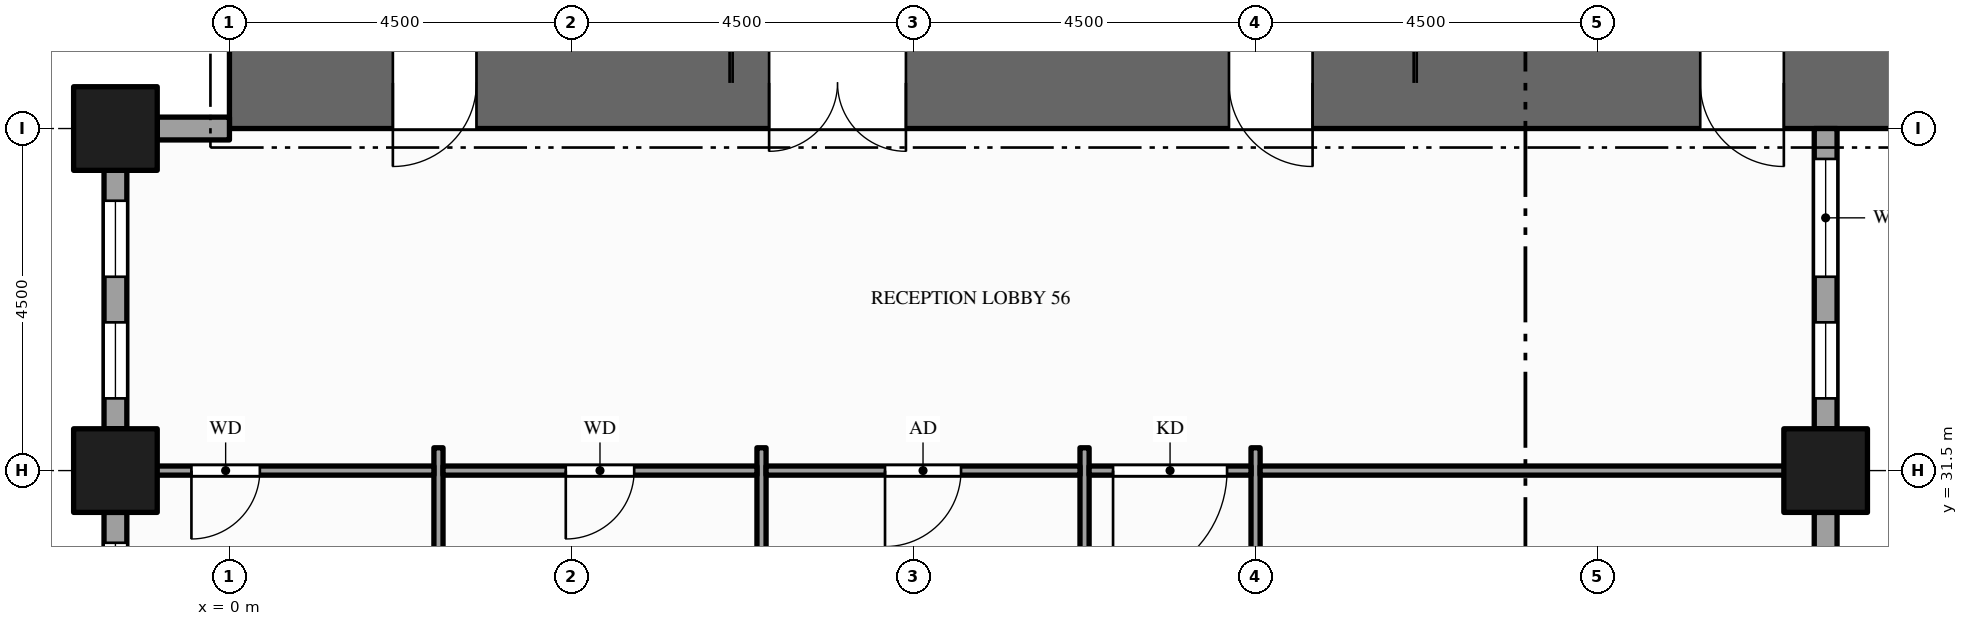
"""IFC4 building model, lengths in metres.
Left out: names, types, materials, properties, quantities, classifications, styles, units other than length and angle.
Written with IfcOpenShell. Run it as: python <this file> out.ifc"""

import sys

from ifc_helpers import new_model, si_unit, direction, frame, frame_2d, origin, origin_2d, place, context, subcontext, project, spatial, rectangle, hollow_rectangle, extrude, element, fill, save


model = new_model("IFC4")
c1 = context("Model", 3, precision=1e-05, world=origin(), true_north=direction((0.0, 1.0)))
c2 = subcontext(c1, "Body", "Model", "MODEL_VIEW")
j1 = project(units=[si_unit("LENGTHUNIT", "METRE"), si_unit("PLANEANGLEUNIT", "RADIAN")], contexts=[c1])
p1 = place(None, origin())
s1 = spatial("IfcSite", under=j1, at=p1, CompositionType="ELEMENT")
p2 = place(p1, origin())
s2 = spatial("IfcBuilding", under=s1, at=p2, CompositionType="ELEMENT")
p3 = place(p2, frame((0.0, 0.0, 49.0)))
s3 = spatial("IfcBuildingStorey", under=s2, at=p3, CompositionType="ELEMENT", Elevation=49.0)
p4 = place(p3, frame((0.0, 36.6, -0.15), z_axis=(0.0, 0.0, 1.0), x_axis=(1.0, 0.0, 0.0)))
e1 = element("IfcWall", 1, at=p4, inside=s3, PredefinedType="SHEAR", context=c2, shape_type="SweptSolid", body=[
    extrude(rectangle(XDim=22.5, YDim=1.2, at=frame_2d((11.25, 0.0))), origin(), (0.0, 0.0, 1.0), 4.0),
])
p5 = place(p4, frame((7.1, 0.0, 0.15)))
e2 = element("IfcOpeningElement", 2, at=p5, cuts=e1, PredefinedType="OPENING", context=c2, shape_type="SweptSolid", body=[
    extrude(rectangle(XDim=1.8, YDim=2.1, at=frame_2d((0.9, 1.05))), frame((0.0, 0.61, 0.0), z_axis=(0.0, -1.0, 0.0), x_axis=(1.0, 0.0, 0.0)), (0.0, 0.0, 1.0), 1.22),
])
p6 = place(p4, frame((13.15, 0.0, 0.15)))
e3 = element("IfcOpeningElement", 3, at=p6, cuts=e1, PredefinedType="OPENING", context=c2, shape_type="SweptSolid", body=[
    extrude(rectangle(XDim=1.1, YDim=2.1, at=frame_2d((0.55, 1.05))), frame((0.0, 0.61, 0.0), z_axis=(0.0, -1.0, 0.0), x_axis=(1.0, 0.0, 0.0)), (0.0, 0.0, 1.0), 1.22),
])
p7 = place(p4, frame((2.15, 0.0, 0.15)))
e4 = element("IfcOpeningElement", 4, at=p7, cuts=e1, PredefinedType="OPENING", context=c2, shape_type="SweptSolid", body=[
    extrude(rectangle(XDim=1.1, YDim=2.1, at=frame_2d((0.55, 1.05))), frame((0.0, 0.61, 0.0), z_axis=(0.0, -1.0, 0.0), x_axis=(1.0, 0.0, 0.0)), (0.0, 0.0, 1.0), 1.22),
])
p8 = place(p4, frame((19.35, 0.0, 0.15)))
e5 = element("IfcOpeningElement", 5, at=p8, cuts=e1, PredefinedType="OPENING", context=c2, shape_type="SweptSolid", body=[
    extrude(rectangle(XDim=1.1, YDim=2.1, at=frame_2d((0.55, 1.05))), frame((0.0, 0.61, 0.0), z_axis=(0.0, -1.0, 0.0), x_axis=(1.0, 0.0, 0.0)), (0.0, 0.0, 1.0), 1.22),
])
for number, where, z_axis, x_axis in (
    (6, (-1.5, 31.5, -0.15), (0.0, 0.0, 1.0), (1.0, 0.0, 0.0)),
    (7, (-1.5, 36.0, -0.15), (0.0, 0.0, 1.0), (1.0, 0.0, 0.0)),
    (8, (21.0, 31.5, -0.15), (0.0, 0.0, 1.0), (1.0, 0.0, 0.0)),
):
    element("IfcColumn", number, at=place(p3, frame(where, z_axis=z_axis, x_axis=x_axis)), inside=s3, PredefinedType="COLUMN", context=c2, shape_type="SweptSolid", body=[
        extrude(hollow_rectangle(XDim=1.1, YDim=1.1, WallThickness=0.06, at=origin_2d()), origin(), (0.0, 0.0, 1.0), 4.0),
    ])
p9 = place(p3, frame((21.0, 29.05, 0.0), z_axis=(0.0, 0.0, 1.0), x_axis=(0.0, 1.0, 0.0)))
e9 = element("IfcWall", 9, at=p9, inside=s3, PredefinedType="STANDARD", context=c2, shape_type="SweptSolid", body=[
    extrude(rectangle(XDim=1.9, YDim=0.3, at=frame_2d((0.95, 0.0))), origin(), (0.0, 0.0, 1.0), 3.144),
])
p10 = place(p3, frame((21.0, 32.05, 0.0), z_axis=(0.0, 0.0, 1.0), x_axis=(0.0, 1.0, 0.0)))
e10 = element("IfcWall", 10, at=p10, inside=s3, PredefinedType="STANDARD", context=c2, shape_type="SweptSolid", body=[
    extrude(rectangle(XDim=3.95, YDim=0.3, at=frame_2d((1.975, 0.0))), origin(), (0.0, 0.0, 1.0), 3.144),
])
p11 = place(p10, frame((0.4, 0.0, 0.9)))
e11 = element("IfcOpeningElement", 11, at=p11, cuts=e10, PredefinedType="OPENING", context=c2, shape_type="SweptSolid", body=[
    extrude(rectangle(XDim=1.0, YDim=2.0, at=frame_2d((0.5, 1.0))), frame((0.0, 0.16, 0.0), z_axis=(0.0, -1.0, 0.0), x_axis=(1.0, 0.0, 0.0)), (0.0, 0.0, 1.0), 0.32),
])
p12 = place(p10, frame((2.0, 0.0, 0.9)))
e12 = element("IfcOpeningElement", 12, at=p12, cuts=e10, PredefinedType="OPENING", context=c2, shape_type="SweptSolid", body=[
    extrude(rectangle(XDim=1.55, YDim=2.0, at=frame_2d((0.775, 1.0))), frame((0.0, 0.16, 0.0), z_axis=(0.0, -1.0, 0.0), x_axis=(1.0, 0.0, 0.0)), (0.0, 0.0, 1.0), 0.32),
])
p13 = place(p3, frame((0.0, 36.0, 0.0), z_axis=(0.0, 0.0, 1.0), x_axis=(-1.0, 0.0, 0.0)))
e13 = element("IfcWall", 13, at=p13, inside=s3, PredefinedType="STANDARD", context=c2, shape_type="SweptSolid", body=[
    extrude(rectangle(XDim=0.95, YDim=0.3, at=frame_2d((0.475, 0.0))), origin(), (0.0, 0.0, 1.0), 2.938),
])
p14 = place(p3, frame((-1.5, 35.45, 0.0), z_axis=(0.0, 0.0, 1.0), x_axis=(0.0, -1.0, 0.0)))
e14 = element("IfcWall", 14, at=p14, inside=s3, PredefinedType="STANDARD", context=c2, shape_type="SweptSolid", body=[
    extrude(rectangle(XDim=3.4, YDim=0.3, at=frame_2d((1.7, 0.0))), origin(), (0.0, 0.0, 1.0), 3.144),
])
p15 = place(p14, frame((0.4, 0.0, 0.9)))
e15 = element("IfcOpeningElement", 15, at=p15, cuts=e14, PredefinedType="OPENING", context=c2, shape_type="SweptSolid", body=[
    extrude(rectangle(XDim=1.0, YDim=2.0, at=frame_2d((0.5, 1.0))), frame((0.0, 0.16, 0.0), z_axis=(0.0, -1.0, 0.0), x_axis=(1.0, 0.0, 0.0)), (0.0, 0.0, 1.0), 0.32),
])
p16 = place(p14, frame((2.0, 0.0, 0.9)))
e16 = element("IfcOpeningElement", 16, at=p16, cuts=e14, PredefinedType="OPENING", context=c2, shape_type="SweptSolid", body=[
    extrude(rectangle(XDim=1.0, YDim=2.0, at=frame_2d((0.5, 1.0))), frame((0.0, 0.16, 0.0), z_axis=(0.0, -1.0, 0.0), x_axis=(1.0, 0.0, 0.0)), (0.0, 0.0, 1.0), 0.32),
])
p17 = place(p3, frame((-1.5, 30.95, 0.0), z_axis=(0.0, 0.0, 1.0), x_axis=(0.0, -1.0, 0.0)))
e17 = element("IfcWall", 17, at=p17, inside=s3, PredefinedType="STANDARD", context=c2, shape_type="SweptSolid", body=[
    extrude(rectangle(XDim=3.4, YDim=0.3, at=frame_2d((1.7, 0.0))), origin(), (0.0, 0.0, 1.0), 3.144),
])
p18 = place(p17, frame((0.4, 0.0, 0.9)))
e18 = element("IfcOpeningElement", 18, at=p18, cuts=e17, PredefinedType="OPENING", context=c2, shape_type="SweptSolid", body=[
    extrude(rectangle(XDim=1.0, YDim=2.0, at=frame_2d((0.5, 1.0))), frame((0.0, 0.16, 0.0), z_axis=(0.0, -1.0, 0.0), x_axis=(1.0, 0.0, 0.0)), (0.0, 0.0, 1.0), 0.32),
])
p19 = place(p17, frame((2.0, 0.0, 0.9)))
e19 = element("IfcOpeningElement", 19, at=p19, cuts=e17, PredefinedType="OPENING", context=c2, shape_type="SweptSolid", body=[
    extrude(rectangle(XDim=1.0, YDim=2.0, at=frame_2d((0.5, 1.0))), frame((0.0, 0.16, 0.0), z_axis=(0.0, -1.0, 0.0), x_axis=(1.0, 0.0, 0.0)), (0.0, 0.0, 1.0), 0.32),
])
for number, where, z_axis, x_axis in (
    (20, (2.75, 26.7, 0.0), (0.0, 0.0, 1.0), (0.0, 1.0, 0.0)),
    (21, (7.0, 26.7, 0.0), (0.0, 0.0, 1.0), (0.0, 1.0, 0.0)),
):
    element("IfcWall", number, at=place(p3, frame(where, z_axis=z_axis, x_axis=x_axis)), inside=s3, PredefinedType="PARTITIONING", context=c2, shape_type="SweptSolid", body=[
        extrude(rectangle(XDim=5.1, YDim=0.12, at=frame_2d((2.55, 0.0))), origin(), (0.0, 0.0, 1.0), 3.85),
    ])
p20 = place(p3, frame((11.25, 8.7, 0.0), z_axis=(0.0, 0.0, 1.0), x_axis=(0.0, 1.0, 0.0)))
e22 = element("IfcWall", 22, at=p20, inside=s3, PredefinedType="PARTITIONING", context=c2, shape_type="SweptSolid", body=[
    extrude(rectangle(XDim=23.1, YDim=0.12, at=frame_2d((11.55, 0.0))), origin(), (0.0, 0.0, 1.0), 2.6),
])
p21 = place(p20, frame((2.05, 0.0, 0.0)))
e23 = element("IfcOpeningElement", 23, at=p21, cuts=e22, PredefinedType="OPENING", context=c2, shape_type="SweptSolid", body=[
    extrude(rectangle(XDim=1.0, YDim=2.1, at=frame_2d((0.5, 1.05))), frame((0.0, 0.07, 0.0), z_axis=(0.0, -1.0, 0.0), x_axis=(1.0, 0.0, 0.0)), (0.0, 0.0, 1.0), 0.14),
])
p22 = place(p20, frame((7.675, 0.0, 0.0)))
e24 = element("IfcOpeningElement", 24, at=p22, cuts=e22, PredefinedType="OPENING", context=c2, shape_type="SweptSolid", body=[
    extrude(rectangle(XDim=1.0, YDim=2.1, at=frame_2d((0.5, 1.05))), frame((0.0, 0.07, 0.0), z_axis=(0.0, -1.0, 0.0), x_axis=(1.0, 0.0, 0.0)), (0.0, 0.0, 1.0), 0.14),
])
p23 = place(p20, frame((14.055, 0.0, 0.0)))
e25 = element("IfcOpeningElement", 25, at=p23, cuts=e22, PredefinedType="OPENING", context=c2, shape_type="SweptSolid", body=[
    extrude(rectangle(XDim=1.8, YDim=2.1, at=frame_2d((0.9, 1.05))), frame((0.0, 0.07, 0.0), z_axis=(0.0, -1.0, 0.0), x_axis=(1.0, 0.0, 0.0)), (0.0, 0.0, 1.0), 0.14),
])
p24 = place(p3, frame((13.5, 8.7, 0.0), z_axis=(0.0, 0.0, 1.0), x_axis=(0.0, 1.0, 0.0)))
e26 = element("IfcWall", 26, at=p24, inside=s3, PredefinedType="PARTITIONING", context=c2, shape_type="SweptSolid", body=[
    extrude(rectangle(XDim=23.1, YDim=0.12, at=frame_2d((11.55, 0.0))), origin(), (0.0, 0.0, 1.0), 2.6),
])
p25 = place(p24, frame((20.05, 0.0, 0.0)))
e27 = element("IfcOpeningElement", 27, at=p25, cuts=e26, PredefinedType="OPENING", context=c2, shape_type="SweptSolid", body=[
    extrude(rectangle(XDim=1.0, YDim=2.1, at=frame_2d((0.5, 1.05))), frame((0.0, 0.07, 0.0), z_axis=(0.0, -1.0, 0.0), x_axis=(1.0, 0.0, 0.0)), (0.0, 0.0, 1.0), 0.14),
])
p26 = place(p24, frame((4.2, 0.0, 0.0)))
e28 = element("IfcOpeningElement", 28, at=p26, cuts=e26, PredefinedType="OPENING", context=c2, shape_type="SweptSolid", body=[
    extrude(rectangle(XDim=1.2, YDim=2.1, at=frame_2d((0.6, 1.05))), frame((0.0, 0.07, 0.0), z_axis=(0.0, -1.0, 0.0), x_axis=(1.0, 0.0, 0.0)), (0.0, 0.0, 1.0), 0.14),
])
p27 = place(p3, frame((-1.35, 31.5, 0.0), z_axis=(0.0, 0.0, 1.0), x_axis=(1.0, 0.0, 0.0)))
e29 = element("IfcWall", 29, at=p27, inside=s3, PredefinedType="PARTITIONING", context=c2, shape_type="SweptSolid", body=[
    extrude(rectangle(XDim=4.04, YDim=0.12, at=frame_2d((2.02, 0.0))), origin(), (0.0, 0.0, 1.0), 2.938),
])
p28 = place(p27, frame((0.85, 0.0, 0.0)))
e30 = element("IfcOpeningElement", 30, at=p28, cuts=e29, PredefinedType="OPENING", context=c2, shape_type="SweptSolid", body=[
    extrude(rectangle(XDim=0.9, YDim=2.1, at=frame_2d((0.45, 1.05))), frame((0.0, 0.07, 0.0), z_axis=(0.0, -1.0, 0.0), x_axis=(1.0, 0.0, 0.0)), (0.0, 0.0, 1.0), 0.14),
])
p29 = place(p3, frame((2.81, 31.5, 0.0), z_axis=(0.0, 0.0, 1.0), x_axis=(1.0, 0.0, 0.0)))
e31 = element("IfcWall", 31, at=p29, inside=s3, PredefinedType="PARTITIONING", context=c2, shape_type="SweptSolid", body=[
    extrude(rectangle(XDim=4.13, YDim=0.12, at=frame_2d((2.065, 0.0))), origin(), (0.0, 0.0, 1.0), 2.938),
])
p30 = place(p29, frame((1.615, 0.0, 0.0)))
e32 = element("IfcOpeningElement", 32, at=p30, cuts=e31, PredefinedType="OPENING", context=c2, shape_type="SweptSolid", body=[
    extrude(rectangle(XDim=0.9, YDim=2.1, at=frame_2d((0.45, 1.05))), frame((0.0, 0.07, 0.0), z_axis=(0.0, -1.0, 0.0), x_axis=(1.0, 0.0, 0.0)), (0.0, 0.0, 1.0), 0.14),
])
p31 = place(p3, frame((7.06, 31.5, 0.0), z_axis=(0.0, 0.0, 1.0), x_axis=(1.0, 0.0, 0.0)))
e33 = element("IfcWall", 33, at=p31, inside=s3, PredefinedType="PARTITIONING", context=c2, shape_type="SweptSolid", body=[
    extrude(rectangle(XDim=4.13, YDim=0.12, at=frame_2d((2.065, 0.0))), origin(), (0.0, 0.0, 1.0), 2.938),
])
p32 = place(p31, frame((1.565, 0.0, 0.0)))
e34 = element("IfcOpeningElement", 34, at=p32, cuts=e33, PredefinedType="OPENING", context=c2, shape_type="SweptSolid", body=[
    extrude(rectangle(XDim=1.0, YDim=2.1, at=frame_2d((0.5, 1.05))), frame((0.0, 0.07, 0.0), z_axis=(0.0, -1.0, 0.0), x_axis=(1.0, 0.0, 0.0)), (0.0, 0.0, 1.0), 0.14),
])
p33 = place(p3, frame((11.31, 31.5, 0.0), z_axis=(0.0, 0.0, 1.0), x_axis=(1.0, 0.0, 0.0)))
e35 = element("IfcWall", 35, at=p33, inside=s3, PredefinedType="PARTITIONING", context=c2, shape_type="SweptSolid", body=[
    extrude(rectangle(XDim=2.13, YDim=0.12, at=frame_2d((1.065, 0.0))), origin(), (0.0, 0.0, 1.0), 2.938),
])
p34 = place(p33, frame((0.315, 0.0, 0.0)))
e36 = element("IfcOpeningElement", 36, at=p34, cuts=e35, PredefinedType="OPENING", context=c2, shape_type="SweptSolid", body=[
    extrude(rectangle(XDim=1.5, YDim=2.1, at=frame_2d((0.75, 1.05))), frame((0.0, 0.07, 0.0), z_axis=(0.0, -1.0, 0.0), x_axis=(1.0, 0.0, 0.0)), (0.0, 0.0, 1.0), 0.14),
])
p35 = place(p3, frame((13.56, 31.5, 0.0), z_axis=(0.0, 0.0, 1.0), x_axis=(1.0, 0.0, 0.0)))
e37 = element("IfcWall", 37, at=p35, inside=s3, PredefinedType="PARTITIONING", context=c2, shape_type="SweptSolid", body=[
    extrude(rectangle(XDim=7.29, YDim=0.12, at=frame_2d((3.645, 0.0))), origin(), (0.0, 0.0, 1.0), 2.938),
])
p36 = place(p11, origin())
e38 = element("IfcWindow", 38, at=p36, inside=s3, PartitioningType="SINGLE_PANEL", PredefinedType="WINDOW", context=c2, shape_type="SweptSolid", body=[
    extrude(rectangle(XDim=1.0, YDim=2.0, at=frame_2d((0.5, 1.0))), frame((0.0, 0.03, 0.0), z_axis=(0.0, -1.0, 0.0), x_axis=(1.0, 0.0, 0.0)), (0.0, 0.0, 1.0), 0.06),
])
fill(e11, e38)
p37 = place(p12, origin())
e39 = element("IfcWindow", 39, at=p37, inside=s3, PartitioningType="SINGLE_PANEL", PredefinedType="WINDOW", context=c2, shape_type="SweptSolid", body=[
    extrude(rectangle(XDim=1.55, YDim=2.0, at=frame_2d((0.775, 1.0))), frame((0.0, 0.03, 0.0), z_axis=(0.0, -1.0, 0.0), x_axis=(1.0, 0.0, 0.0)), (0.0, 0.0, 1.0), 0.06),
])
fill(e12, e39)
p38 = place(p15, origin())
e40 = element("IfcWindow", 40, at=p38, inside=s3, PartitioningType="SINGLE_PANEL", PredefinedType="WINDOW", context=c2, shape_type="SweptSolid", body=[
    extrude(rectangle(XDim=1.0, YDim=2.0, at=frame_2d((0.5, 1.0))), frame((0.0, 0.03, 0.0), z_axis=(0.0, -1.0, 0.0), x_axis=(1.0, 0.0, 0.0)), (0.0, 0.0, 1.0), 0.06),
])
fill(e15, e40)
p39 = place(p16, origin())
e41 = element("IfcWindow", 41, at=p39, inside=s3, PartitioningType="SINGLE_PANEL", PredefinedType="WINDOW", context=c2, shape_type="SweptSolid", body=[
    extrude(rectangle(XDim=1.0, YDim=2.0, at=frame_2d((0.5, 1.0))), frame((0.0, 0.03, 0.0), z_axis=(0.0, -1.0, 0.0), x_axis=(1.0, 0.0, 0.0)), (0.0, 0.0, 1.0), 0.06),
])
fill(e16, e41)
p40 = place(p18, origin())
e42 = element("IfcWindow", 42, at=p40, inside=s3, PartitioningType="SINGLE_PANEL", PredefinedType="WINDOW", context=c2, shape_type="SweptSolid", body=[
    extrude(rectangle(XDim=1.0, YDim=2.0, at=frame_2d((0.5, 1.0))), frame((0.0, 0.03, 0.0), z_axis=(0.0, -1.0, 0.0), x_axis=(1.0, 0.0, 0.0)), (0.0, 0.0, 1.0), 0.06),
])
fill(e18, e42)
p41 = place(p5, origin())
e43 = element("IfcDoor", 43, at=p41, inside=s3, OperationType="DOUBLE_DOOR_SINGLE_SWING", PredefinedType="DOOR", context=c2, shape_type="SweptSolid", body=[
    extrude(rectangle(XDim=1.8, YDim=2.1, at=frame_2d((0.9, 1.05))), frame((0.0, 0.025, 0.0), z_axis=(0.0, -1.0, 0.0), x_axis=(1.0, 0.0, 0.0)), (0.0, 0.0, 1.0), 0.05),
])
fill(e2, e43)
p42 = place(p6, origin())
e44 = element("IfcDoor", 44, at=p42, inside=s3, OperationType="SINGLE_SWING_RIGHT", PredefinedType="DOOR", context=c2, shape_type="SweptSolid", body=[
    extrude(rectangle(XDim=1.1, YDim=2.1, at=frame_2d((0.55, 1.05))), frame((0.0, 0.025, 0.0), z_axis=(0.0, -1.0, 0.0), x_axis=(1.0, 0.0, 0.0)), (0.0, 0.0, 1.0), 0.05),
])
fill(e3, e44)
p43 = place(p7, origin())
e45 = element("IfcDoor", 45, at=p43, inside=s3, OperationType="SINGLE_SWING_LEFT", PredefinedType="DOOR", context=c2, shape_type="SweptSolid", body=[
    extrude(rectangle(XDim=1.1, YDim=2.1, at=frame_2d((0.55, 1.05))), frame((0.0, 0.025, 0.0), z_axis=(0.0, -1.0, 0.0), x_axis=(1.0, 0.0, 0.0)), (0.0, 0.0, 1.0), 0.05),
])
fill(e4, e45)
p44 = place(p8, origin())
e46 = element("IfcDoor", 46, at=p44, inside=s3, OperationType="SINGLE_SWING_RIGHT", PredefinedType="DOOR", context=c2, shape_type="SweptSolid", body=[
    extrude(rectangle(XDim=1.1, YDim=2.1, at=frame_2d((0.55, 1.05))), frame((0.0, 0.025, 0.0), z_axis=(0.0, -1.0, 0.0), x_axis=(1.0, 0.0, 0.0)), (0.0, 0.0, 1.0), 0.05),
])
fill(e5, e46)
p45 = place(p34, origin())
e47 = element("IfcDoor", 47, at=p45, inside=s3, OperationType="SINGLE_SWING_LEFT", PredefinedType="DOOR", context=c2, shape_type="SweptSolid", body=[
    extrude(rectangle(XDim=1.5, YDim=2.1, at=frame_2d((0.75, 1.05))), frame((0.0, 0.025, 0.0), z_axis=(0.0, -1.0, 0.0), x_axis=(1.0, 0.0, 0.0)), (0.0, 0.0, 1.0), 0.05),
])
fill(e36, e47)
p46 = place(p28, origin())
e48 = element("IfcDoor", 48, at=p46, inside=s3, OperationType="SINGLE_SWING_LEFT", PredefinedType="DOOR", context=c2, shape_type="SweptSolid", body=[
    extrude(rectangle(XDim=0.9, YDim=2.1, at=frame_2d((0.45, 1.05))), frame((0.0, 0.025, 0.0), z_axis=(0.0, -1.0, 0.0), x_axis=(1.0, 0.0, 0.0)), (0.0, 0.0, 1.0), 0.05),
])
fill(e30, e48)
p47 = place(p30, origin())
e49 = element("IfcDoor", 49, at=p47, inside=s3, OperationType="SINGLE_SWING_LEFT", PredefinedType="DOOR", context=c2, shape_type="SweptSolid", body=[
    extrude(rectangle(XDim=0.9, YDim=2.1, at=frame_2d((0.45, 1.05))), frame((0.0, 0.025, 0.0), z_axis=(0.0, -1.0, 0.0), x_axis=(1.0, 0.0, 0.0)), (0.0, 0.0, 1.0), 0.05),
])
fill(e32, e49)
p48 = place(p32, origin())
e50 = element("IfcDoor", 50, at=p48, inside=s3, OperationType="SINGLE_SWING_LEFT", PredefinedType="DOOR", context=c2, shape_type="SweptSolid", body=[
    extrude(rectangle(XDim=1.0, YDim=2.1, at=frame_2d((0.5, 1.05))), frame((0.0, 0.025, 0.0), z_axis=(0.0, -1.0, 0.0), x_axis=(1.0, 0.0, 0.0)), (0.0, 0.0, 1.0), 0.05),
])
fill(e34, e50)
save(model, sys.argv[1])
